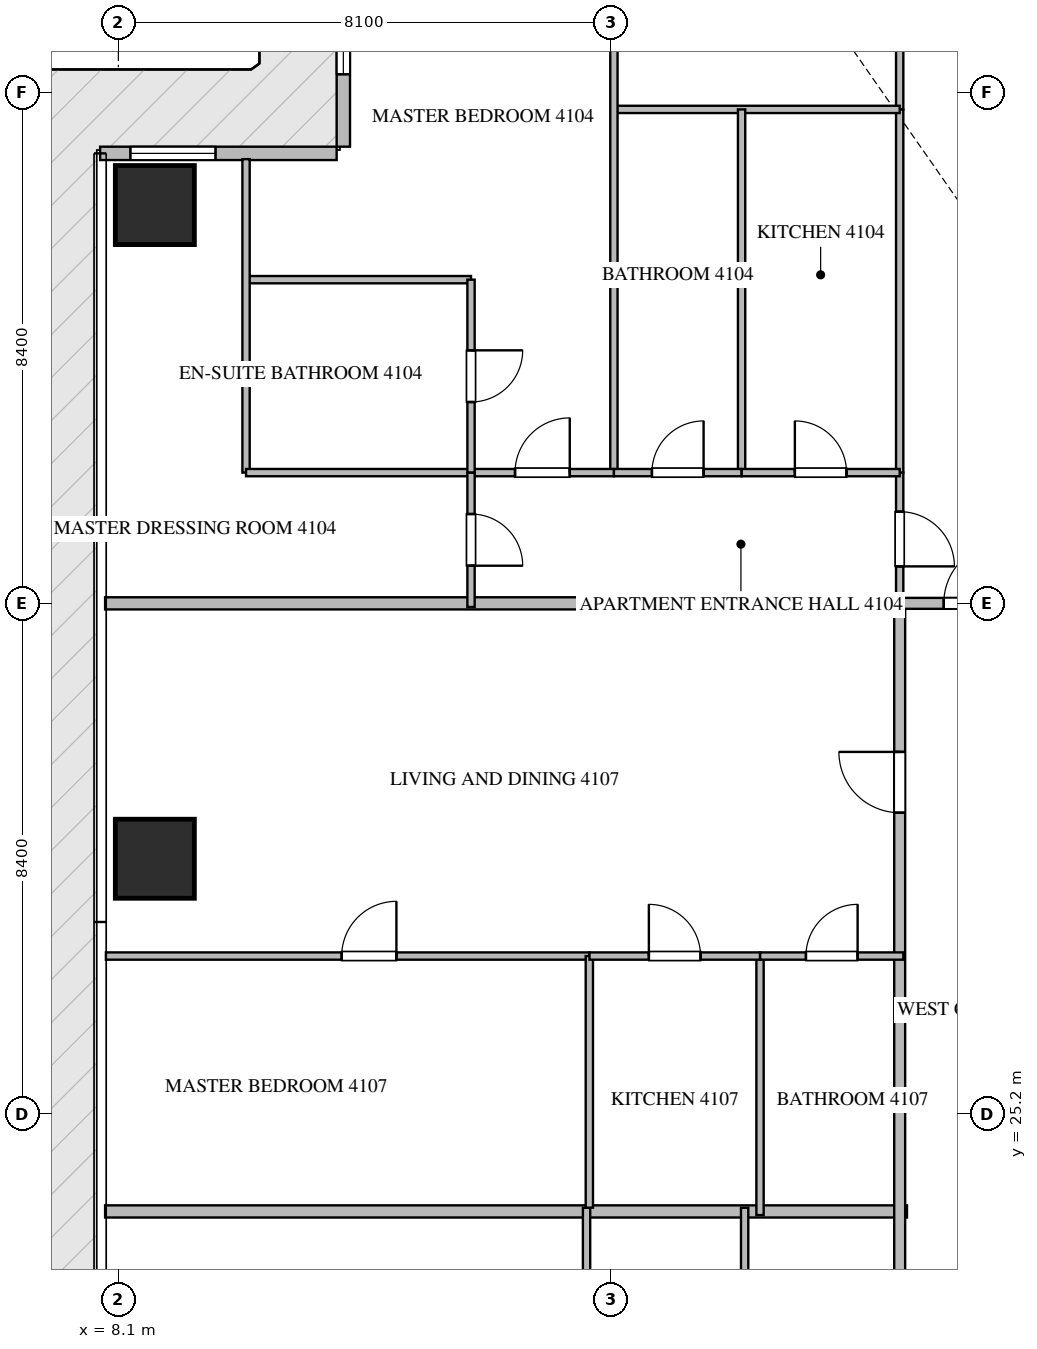
"""IFC4 building model, lengths in metres.
Left out: names, types, materials, properties, quantities, classifications, styles, units other than length and angle.
Written with IfcOpenShell. Run it as: python <this file> out.ifc"""

import sys

from ifc_helpers import new_model, si_unit, direction, frame, frame_2d, origin, origin_2d, place, context, subcontext, project, spatial, rectangle, extrude, source, transform, mapped, element, fill, save


model = new_model("IFC4")
c1 = context("Model", 3, precision=1e-05, world=origin(), true_north=direction((0.0, 1.0)))
c2 = subcontext(c1, "Body", "Model", "MODEL_VIEW")
j1 = project(units=[si_unit("LENGTHUNIT", "METRE"), si_unit("PLANEANGLEUNIT", "RADIAN")], contexts=[c1])
p1 = place(None, origin())
s1 = spatial("IfcSite", under=j1, at=p1, CompositionType="ELEMENT")
p2 = place(p1, origin())
s2 = spatial("IfcBuilding", under=s1, at=p2, CompositionType="ELEMENT")
p3 = place(p2, frame((0.0, 0.0, 165.15)))
s3 = spatial("IfcBuildingStorey", under=s2, at=p3, CompositionType="ELEMENT", Elevation=165.15)
m1 = source(origin(), c2, "Body", "SweptSolid", [
    extrude(rectangle(XDim=1.3, YDim=1.3, at=origin_2d()), origin(), (0.0, 0.0, 1.0), 3.75),
])
for number, where, z_axis, x_axis in (
    (1, (8.7, 29.4, -0.26), (0.0, 0.0, 1.0), (1.0, 0.0, 0.0)),
    (2, (8.7, 40.15, -0.26), (0.0, 0.0, 1.0), (1.0, 0.0, 0.0)),
):
    element("IfcColumn", number, at=place(p3, frame(where, z_axis=z_axis, x_axis=x_axis)), inside=s3, PredefinedType="COLUMN", context=c2, shape_type="MappedRepresentation", body=[
        mapped(m1, transform((0.0, 0.0, 0.0), scale=1.0)),
    ])
p4 = place(p3, frame((11.8, 44.89, 0.0), z_axis=(0.0, 0.0, 1.0), x_axis=(0.0, -1.0, 0.0)))
e3 = element("IfcWall", 3, at=p4, inside=s3, PredefinedType="ELEMENTEDWALL", context=c2, shape_type="SweptSolid", body=[
    extrude(rectangle(XDim=3.78, YDim=0.22, at=frame_2d((1.89, 0.0))), origin(), (0.0, 0.0, 1.0), 3.475),
])
p5 = place(p4, frame((1.19, 0.0, 0.65)))
e4 = element("IfcOpeningElement", 4, at=p5, cuts=e3, PredefinedType="OPENING", context=c2, shape_type="SweptSolid", body=[
    extrude(rectangle(XDim=1.4, YDim=2.05, at=frame_2d((0.7, 1.025))), frame((0.0, 0.12, 0.0), z_axis=(0.0, -1.0, 0.0), x_axis=(1.0, 0.0, 0.0)), (0.0, 0.0, 1.0), 0.24),
])
p6 = place(p3, frame((11.69, 41.0, 0.0), z_axis=(0.0, 0.0, 1.0), x_axis=(-1.0, 0.0, 0.0)))
e5 = element("IfcWall", 5, at=p6, inside=s3, PredefinedType="ELEMENTEDWALL", context=c2, shape_type="SweptSolid", body=[
    extrude(rectangle(XDim=3.89, YDim=0.22, at=frame_2d((1.945, 0.0))), origin(), (0.0, 0.0, 1.0), 3.475),
])
p7 = place(p6, frame((1.992, 0.0, 0.65)))
e6 = element("IfcOpeningElement", 6, at=p7, cuts=e5, PredefinedType="OPENING", context=c2, shape_type="SweptSolid", body=[
    extrude(rectangle(XDim=1.4, YDim=2.05, at=frame_2d((0.7, 1.025))), frame((0.0, 0.12, 0.0), z_axis=(0.0, -1.0, 0.0), x_axis=(1.0, 0.0, 0.0)), (0.0, 0.0, 1.0), 0.24),
])
p8 = place(p3, frame((7.882, 23.6, 0.0), z_axis=(0.0, 0.0, 1.0), x_axis=(1.0, 0.0, 0.0)))
e7 = element("IfcWall", 7, at=p8, inside=s3, PredefinedType="PARTITIONING", context=c2, shape_type="SweptSolid", body=[
    extrude(rectangle(XDim=13.188, YDim=0.2, at=frame_2d((6.594, 0.0))), origin(), (0.0, 0.0, 1.0), 3.49),
])
p9 = place(p3, frame((7.882, 33.6, 0.0), z_axis=(0.0, 0.0, 1.0), x_axis=(1.0, 0.0, 0.0)))
e8 = element("IfcWall", 8, at=p9, inside=s3, PredefinedType="PARTITIONING", context=c2, shape_type="SweptSolid", body=[
    extrude(rectangle(XDim=13.068, YDim=0.2, at=frame_2d((6.534, 0.0))), origin(), (0.0, 0.0, 1.0), 3.49),
])
p10 = place(p3, frame((20.95, 14.9, 0.0), z_axis=(0.0, 0.0, 1.0), x_axis=(0.0, 1.0, 0.0)))
e9 = element("IfcWall", 9, at=p10, inside=s3, PredefinedType="PARTITIONING", context=c2, shape_type="SweptSolid", body=[
    extrude(rectangle(XDim=18.7, YDim=0.18, at=frame_2d((9.35, 0.0))), origin(), (0.0, 0.0, 1.0), 3.49),
])
p11 = place(p10, frame((1.805, 0.0, 0.0)))
e10 = element("IfcOpeningElement", 10, at=p11, cuts=e9, PredefinedType="OPENING", context=c2, shape_type="SweptSolid", body=[
    extrude(rectangle(XDim=1.0, YDim=2.15, at=frame_2d((0.5, 1.075))), frame((0.0, 0.1, 0.0), z_axis=(0.0, -1.0, 0.0), x_axis=(1.0, 0.0, 0.0)), (0.0, 0.0, 1.0), 0.2),
])
p12 = place(p10, frame((15.257, 0.0, 0.0)))
e11 = element("IfcOpeningElement", 11, at=p12, cuts=e9, PredefinedType="OPENING", context=c2, shape_type="SweptSolid", body=[
    extrude(rectangle(XDim=1.0, YDim=2.15, at=frame_2d((0.5, 1.075))), frame((0.0, 0.1, 0.0), z_axis=(0.0, -1.0, 0.0), x_axis=(1.0, 0.0, 0.0)), (0.0, 0.0, 1.0), 0.2),
])
p13 = place(p3, frame((20.952, 33.6, 0.0), z_axis=(0.0, 0.0, 1.0), x_axis=(1.0, 0.0, 0.0)))
e12 = element("IfcWall", 12, at=p13, inside=s3, PredefinedType="PARTITIONING", context=c2, shape_type="SweptSolid", body=[
    extrude(rectangle(XDim=2.446, YDim=0.18, at=frame_2d((1.223, 0.0))), origin(), (0.0, 0.0, 1.0), 3.49),
])
p14 = place(p13, frame((0.723, 0.0, 0.0)))
e13 = element("IfcOpeningElement", 13, at=p14, cuts=e12, PredefinedType="OPENING", context=c2, shape_type="SweptSolid", body=[
    extrude(rectangle(XDim=1.0, YDim=2.15, at=frame_2d((0.5, 1.075))), frame((0.0, 0.1, 0.0), z_axis=(0.0, -1.0, 0.0), x_axis=(1.0, 0.0, 0.0)), (0.0, 0.0, 1.0), 0.2),
])
p15 = place(p3, frame((20.95, 35.75, 0.0), z_axis=(0.0, 0.0, 1.0), x_axis=(0.0, -1.0, 0.0)))
e14 = element("IfcWall", 14, at=p15, inside=s3, PredefinedType="PARTITIONING", context=c2, shape_type="SweptSolid", body=[
    extrude(rectangle(XDim=2.148, YDim=0.12, at=frame_2d((1.074, 0.0))), origin(), (0.0, 0.0, 1.0), 3.49),
])
p16 = place(p15, frame((0.642, 0.0, 0.0)))
e15 = element("IfcOpeningElement", 15, at=p16, cuts=e14, PredefinedType="OPENING", context=c2, shape_type="SweptSolid", body=[
    extrude(rectangle(XDim=0.9, YDim=2.1, at=frame_2d((0.45, 1.05))), frame((0.0, 0.07, 0.0), z_axis=(0.0, -1.0, 0.0), x_axis=(1.0, 0.0, 0.0)), (0.0, 0.0, 1.0), 0.14),
])
p17 = place(p3, frame((20.95, 48.905, 0.0), z_axis=(0.0, 0.0, 1.0), x_axis=(0.0, -1.0, 0.0)))
e16 = element("IfcWall", 16, at=p17, inside=s3, PredefinedType="PARTITIONING", context=c2, shape_type="SweptSolid", body=[
    extrude(rectangle(XDim=7.182, YDim=0.12, at=frame_2d((3.591, 0.0))), origin(), (0.0, 0.0, 1.0), 3.49),
])
p18 = place(p17, frame((3.455, 0.0, 0.0)))
e17 = element("IfcOpeningElement", 17, at=p18, cuts=e16, PredefinedType="OPENING", context=c2, shape_type="SweptSolid", body=[
    extrude(rectangle(XDim=0.9, YDim=2.1, at=frame_2d((0.45, 1.05))), frame((0.0, 0.07, 0.0), z_axis=(0.0, -1.0, 0.0), x_axis=(1.0, 0.0, 0.0)), (0.0, 0.0, 1.0), 0.14),
])
p19 = place(p3, frame((20.95, 41.721, 0.0), z_axis=(0.0, 0.0, 1.0), x_axis=(0.0, -1.0, 0.0)))
e18 = element("IfcWall", 18, at=p19, inside=s3, PredefinedType="PARTITIONING", context=c2, shape_type="SweptSolid", body=[
    extrude(rectangle(XDim=5.969, YDim=0.12, at=frame_2d((2.984, 0.0))), origin(), (0.0, 0.0, 1.0), 3.49),
])
p20 = place(p3, frame((16.25, 41.723, 0.0), z_axis=(0.0, 0.0, 1.0), x_axis=(1.0, 0.0, 0.0)))
e19 = element("IfcWall", 19, at=p20, inside=s3, PredefinedType="PARTITIONING", context=c2, shape_type="SweptSolid", body=[
    extrude(rectangle(XDim=4.7, YDim=0.12, at=frame_2d((2.35, 0.0))), origin(), (0.0, 0.0, 1.0), 3.49),
])
p21 = place(p3, frame((16.25, 48.905, 0.0), z_axis=(0.0, 0.0, 1.0), x_axis=(0.0, -1.0, 0.0)))
e20 = element("IfcWall", 20, at=p21, inside=s3, PredefinedType="PARTITIONING", context=c2, shape_type="SweptSolid", body=[
    extrude(rectangle(XDim=13.155, YDim=0.12, at=frame_2d((6.578, 0.0))), origin(), (0.0, 0.0, 1.0), 3.49),
])
p22 = place(p3, frame((18.35, 41.723, 0.0), z_axis=(0.0, 0.0, 1.0), x_axis=(0.0, -1.0, 0.0)))
e21 = element("IfcWall", 21, at=p22, inside=s3, PredefinedType="PARTITIONING", context=c2, shape_type="SweptSolid", body=[
    extrude(rectangle(XDim=5.973, YDim=0.12, at=frame_2d((2.986, 0.0))), origin(), (0.0, 0.0, 1.0), 3.49),
])
p23 = place(p3, frame((16.25, 35.75, 0.0), z_axis=(0.0, 0.0, 1.0), x_axis=(1.0, 0.0, 0.0)))
e22 = element("IfcWall", 22, at=p23, inside=s3, PredefinedType="PARTITIONING", context=c2, shape_type="SweptSolid", body=[
    extrude(rectangle(XDim=2.1, YDim=0.12, at=frame_2d((1.05, 0.0))), origin(), (0.0, 0.0, 1.0), 3.49),
])
p24 = place(p23, frame((0.625, 0.0, 0.0)))
e23 = element("IfcOpeningElement", 23, at=p24, cuts=e22, PredefinedType="OPENING", context=c2, shape_type="SweptSolid", body=[
    extrude(rectangle(XDim=0.85, YDim=2.1, at=frame_2d((0.425, 1.05))), frame((0.0, 0.07, 0.0), z_axis=(0.0, -1.0, 0.0), x_axis=(1.0, 0.0, 0.0)), (0.0, 0.0, 1.0), 0.14),
])
p25 = place(p3, frame((18.352, 35.75, 0.0), z_axis=(0.0, 0.0, 1.0), x_axis=(1.0, 0.0, 0.0)))
e24 = element("IfcWall", 24, at=p25, inside=s3, PredefinedType="PARTITIONING", context=c2, shape_type="SweptSolid", body=[
    extrude(rectangle(XDim=2.598, YDim=0.12, at=frame_2d((1.299, 0.0))), origin(), (0.0, 0.0, 1.0), 3.49),
])
p26 = place(p25, frame((0.874, 0.0, 0.0)))
e25 = element("IfcOpeningElement", 25, at=p26, cuts=e24, PredefinedType="OPENING", context=c2, shape_type="SweptSolid", body=[
    extrude(rectangle(XDim=0.85, YDim=2.1, at=frame_2d((0.425, 1.05))), frame((0.0, 0.07, 0.0), z_axis=(0.0, -1.0, 0.0), x_axis=(1.0, 0.0, 0.0)), (0.0, 0.0, 1.0), 0.14),
])
p27 = place(p3, frame((13.9, 35.75, 0.0), z_axis=(0.0, 0.0, 1.0), x_axis=(1.0, 0.0, 0.0)))
e26 = element("IfcWall", 26, at=p27, inside=s3, PredefinedType="PARTITIONING", context=c2, shape_type="SweptSolid", body=[
    extrude(rectangle(XDim=2.348, YDim=0.12, at=frame_2d((1.174, 0.0))), origin(), (0.0, 0.0, 1.0), 3.49),
])
p28 = place(p27, frame((0.724, 0.0, 0.0)))
e27 = element("IfcOpeningElement", 27, at=p28, cuts=e26, PredefinedType="OPENING", context=c2, shape_type="SweptSolid", body=[
    extrude(rectangle(XDim=0.9, YDim=2.1, at=frame_2d((0.45, 1.05))), frame((0.0, 0.07, 0.0), z_axis=(0.0, -1.0, 0.0), x_axis=(1.0, 0.0, 0.0)), (0.0, 0.0, 1.0), 0.14),
])
p29 = place(p3, frame((10.2, 38.923, 0.0), z_axis=(0.0, 0.0, 1.0), x_axis=(1.0, 0.0, 0.0)))
e28 = element("IfcWall", 28, at=p29, inside=s3, PredefinedType="PARTITIONING", context=c2, shape_type="SweptSolid", body=[
    extrude(rectangle(XDim=3.7, YDim=0.12, at=frame_2d((1.85, 0.0))), origin(), (0.0, 0.0, 1.0), 3.49),
])
p30 = place(p3, frame((10.2, 40.905, 0.0), z_axis=(0.0, 0.0, 1.0), x_axis=(0.0, -1.0, 0.0)))
e29 = element("IfcWall", 29, at=p30, inside=s3, PredefinedType="PARTITIONING", context=c2, shape_type="SweptSolid", body=[
    extrude(rectangle(XDim=5.155, YDim=0.12, at=frame_2d((2.578, 0.0))), origin(), (0.0, 0.0, 1.0), 3.49),
])
p31 = place(p3, frame((10.2, 35.75, 0.0), z_axis=(0.0, 0.0, 1.0), x_axis=(1.0, 0.0, 0.0)))
e30 = element("IfcWall", 30, at=p31, inside=s3, PredefinedType="PARTITIONING", context=c2, shape_type="SweptSolid", body=[
    extrude(rectangle(XDim=3.698, YDim=0.12, at=frame_2d((1.849, 0.0))), origin(), (0.0, 0.0, 1.0), 3.49),
])
p32 = place(p3, frame((13.9, 38.923, 0.0), z_axis=(0.0, 0.0, 1.0), x_axis=(0.0, -1.0, 0.0)))
e31 = element("IfcWall", 31, at=p32, inside=s3, PredefinedType="PARTITIONING", context=c2, shape_type="SweptSolid", body=[
    extrude(rectangle(XDim=3.173, YDim=0.12, at=frame_2d((1.586, 0.0))), origin(), (0.0, 0.0, 1.0), 3.49),
])
p33 = place(p32, frame((1.162, 0.0, 0.0)))
e32 = element("IfcOpeningElement", 32, at=p33, cuts=e31, PredefinedType="OPENING", context=c2, shape_type="SweptSolid", body=[
    extrude(rectangle(XDim=0.85, YDim=2.1, at=frame_2d((0.425, 1.05))), frame((0.0, 0.07, 0.0), z_axis=(0.0, -1.0, 0.0), x_axis=(1.0, 0.0, 0.0)), (0.0, 0.0, 1.0), 0.14),
])
p34 = place(p3, frame((13.9, 35.748, 0.0), z_axis=(0.0, 0.0, 1.0), x_axis=(0.0, -1.0, 0.0)))
e33 = element("IfcWall", 33, at=p34, inside=s3, PredefinedType="PARTITIONING", context=c2, shape_type="SweptSolid", body=[
    extrude(rectangle(XDim=2.208, YDim=0.12, at=frame_2d((1.104, 0.0))), origin(), (0.0, 0.0, 1.0), 3.49),
])
p35 = place(p34, frame((0.679, 0.0, 0.0)))
e34 = element("IfcOpeningElement", 34, at=p35, cuts=e33, PredefinedType="OPENING", context=c2, shape_type="SweptSolid", body=[
    extrude(rectangle(XDim=0.85, YDim=2.1, at=frame_2d((0.425, 1.05))), frame((0.0, 0.07, 0.0), z_axis=(0.0, -1.0, 0.0), x_axis=(1.0, 0.0, 0.0)), (0.0, 0.0, 1.0), 0.14),
])
for number, where, z_axis, x_axis in (
    (35, (18.4, 19.4, 0.0), (0.0, 0.0, 1.0), (0.0, 1.0, 0.0)),
    (36, (15.8, 19.4, 0.0), (0.0, 0.0, 1.0), (0.0, 1.0, 0.0)),
):
    element("IfcWall", number, at=place(p3, frame(where, z_axis=z_axis, x_axis=x_axis)), inside=s3, PredefinedType="PARTITIONING", context=c2, shape_type="SweptSolid", body=[
        extrude(rectangle(XDim=4.26, YDim=0.12, at=frame_2d((2.13, 0.0))), origin(), (0.0, 0.0, 1.0), 3.49),
    ])
p36 = place(p3, frame((7.895, 27.8, 0.0), z_axis=(0.0, 0.0, 1.0), x_axis=(1.0, 0.0, 0.0)))
e37 = element("IfcWall", 37, at=p36, inside=s3, PredefinedType="PARTITIONING", context=c2, shape_type="SweptSolid", body=[
    extrude(rectangle(XDim=7.951, YDim=0.12, at=frame_2d((3.976, 0.0))), origin(), (0.0, 0.0, 1.0), 3.49),
])
p37 = place(p36, frame((3.878, 0.0, 0.0)))
e38 = element("IfcOpeningElement", 38, at=p37, cuts=e37, PredefinedType="OPENING", context=c2, shape_type="SweptSolid", body=[
    extrude(rectangle(XDim=0.9, YDim=2.1, at=frame_2d((0.45, 1.05))), frame((0.0, 0.07, 0.0), z_axis=(0.0, -1.0, 0.0), x_axis=(1.0, 0.0, 0.0)), (0.0, 0.0, 1.0), 0.14),
])
p38 = place(p3, frame((15.846, 23.662, 0.0), z_axis=(0.0, 0.0, 1.0), x_axis=(0.0, 1.0, 0.0)))
e39 = element("IfcWall", 39, at=p38, inside=s3, PredefinedType="PARTITIONING", context=c2, shape_type="SweptSolid", body=[
    extrude(rectangle(XDim=4.138, YDim=0.12, at=frame_2d((2.069, 0.0))), origin(), (0.0, 0.0, 1.0), 3.49),
])
p39 = place(p3, frame((18.653, 23.54, 0.0), z_axis=(0.0, 0.0, 1.0), x_axis=(0.0, 1.0, 0.0)))
e40 = element("IfcWall", 40, at=p39, inside=s3, PredefinedType="PARTITIONING", context=c2, shape_type="SweptSolid", body=[
    extrude(rectangle(XDim=4.26, YDim=0.12, at=frame_2d((2.13, 0.0))), origin(), (0.0, 0.0, 1.0), 3.49),
])
p40 = place(p3, frame((15.848, 27.8, 0.0), z_axis=(0.0, 0.0, 1.0), x_axis=(1.0, 0.0, 0.0)))
e41 = element("IfcWall", 41, at=p40, inside=s3, PredefinedType="PARTITIONING", context=c2, shape_type="SweptSolid", body=[
    extrude(rectangle(XDim=2.805, YDim=0.12, at=frame_2d((1.403, 0.0))), origin(), (0.0, 0.0, 1.0), 3.49),
])
p41 = place(p40, frame((0.977, 0.0, 0.0)))
e42 = element("IfcOpeningElement", 42, at=p41, cuts=e41, PredefinedType="OPENING", context=c2, shape_type="SweptSolid", body=[
    extrude(rectangle(XDim=0.85, YDim=2.1, at=frame_2d((0.425, 1.05))), frame((0.0, 0.07, 0.0), z_axis=(0.0, -1.0, 0.0), x_axis=(1.0, 0.0, 0.0)), (0.0, 0.0, 1.0), 0.14),
])
p42 = place(p3, frame((18.655, 27.8, 0.0), z_axis=(0.0, 0.0, 1.0), x_axis=(1.0, 0.0, 0.0)))
e43 = element("IfcWall", 43, at=p42, inside=s3, PredefinedType="PARTITIONING", context=c2, shape_type="SweptSolid", body=[
    extrude(rectangle(XDim=2.355, YDim=0.12, at=frame_2d((1.177, 0.0))), origin(), (0.0, 0.0, 1.0), 3.49),
])
p43 = place(p42, frame((0.753, 0.0, 0.0)))
e44 = element("IfcOpeningElement", 44, at=p43, cuts=e43, PredefinedType="OPENING", context=c2, shape_type="SweptSolid", body=[
    extrude(rectangle(XDim=0.85, YDim=2.1, at=frame_2d((0.425, 1.05))), frame((0.0, 0.07, 0.0), z_axis=(0.0, -1.0, 0.0), x_axis=(1.0, 0.0, 0.0)), (0.0, 0.0, 1.0), 0.14),
])
m2 = source(origin(), c2, "Body", "SweptSolid", [
    extrude(rectangle(XDim=1.4, YDim=2.05, at=frame_2d((0.7, 1.025))), frame((0.0, 0.03, 0.0), z_axis=(0.0, -1.0, 0.0), x_axis=(1.0, 0.0, 0.0)), (0.0, 0.0, 1.0), 0.06),
])
p44 = place(p5, origin())
e45 = element("IfcWindow", 45, at=p44, inside=s3, PartitioningType="SINGLE_PANEL", PredefinedType="WINDOW", context=c2, shape_type="MappedRepresentation", body=[
    mapped(m2, transform((0.0, 0.0, 0.0), scale=1.0)),
])
fill(e4, e45)
p45 = place(p7, origin())
e46 = element("IfcWindow", 46, at=p45, inside=s3, PartitioningType="SINGLE_PANEL", PredefinedType="WINDOW", context=c2, shape_type="MappedRepresentation", body=[
    mapped(m2, transform((0.0, 0.0, 0.0), scale=1.0)),
])
fill(e6, e46)
m3 = source(origin(), c2, "Body", "SweptSolid", [
    extrude(rectangle(XDim=1.0, YDim=2.15, at=frame_2d((0.5, 1.075))), frame((0.0, 0.025, 0.0), z_axis=(0.0, -1.0, 0.0), x_axis=(1.0, 0.0, 0.0)), (0.0, 0.0, 1.0), 0.05),
])
p46 = place(p12, origin())
e47 = element("IfcDoor", 47, at=p46, inside=s3, OperationType="SINGLE_SWING_RIGHT", PredefinedType="DOOR", context=c2, shape_type="MappedRepresentation", body=[
    mapped(m3, transform((0.0, 0.0, 0.0), scale=1.0)),
])
fill(e11, e47)
p47 = place(p14, origin())
e48 = element("IfcDoor", 48, at=p47, inside=s3, OperationType="SINGLE_SWING_RIGHT", PredefinedType="DOOR", context=c2, shape_type="MappedRepresentation", body=[
    mapped(m3, transform((0.0, 0.0, 0.0), scale=1.0)),
])
fill(e13, e48)
m4 = source(origin(), c2, "Body", "SweptSolid", [
    extrude(rectangle(XDim=0.9, YDim=2.1, at=frame_2d((0.45, 1.05))), frame((0.0, 0.025, 0.0), z_axis=(0.0, -1.0, 0.0), x_axis=(1.0, 0.0, 0.0)), (0.0, 0.0, 1.0), 0.05),
])
p48 = place(p16, origin())
e49 = element("IfcDoor", 49, at=p48, inside=s3, OperationType="SINGLE_SWING_RIGHT", PredefinedType="DOOR", context=c2, shape_type="MappedRepresentation", body=[
    mapped(m4, transform((0.0, 0.0, 0.0), scale=1.0)),
])
fill(e15, e49)
m5 = source(origin(), c2, "Body", "SweptSolid", [
    extrude(rectangle(XDim=0.85, YDim=2.1, at=frame_2d((0.425, 1.05))), frame((0.0, 0.025, 0.0), z_axis=(0.0, -1.0, 0.0), x_axis=(1.0, 0.0, 0.0)), (0.0, 0.0, 1.0), 0.05),
])
p49 = place(p24, origin())
e50 = element("IfcDoor", 50, at=p49, inside=s3, OperationType="SINGLE_SWING_RIGHT", PredefinedType="DOOR", context=c2, shape_type="MappedRepresentation", body=[
    mapped(m5, transform((0.0, 0.0, 0.0), scale=1.0)),
])
fill(e23, e50)
p50 = place(p26, origin())
e51 = element("IfcDoor", 51, at=p50, inside=s3, OperationType="SINGLE_SWING_LEFT", PredefinedType="DOOR", context=c2, shape_type="MappedRepresentation", body=[
    mapped(m5, transform((0.0, 0.0, 0.0), scale=1.0)),
])
fill(e25, e51)
p51 = place(p28, origin())
e52 = element("IfcDoor", 52, at=p51, inside=s3, OperationType="SINGLE_SWING_RIGHT", PredefinedType="DOOR", context=c2, shape_type="MappedRepresentation", body=[
    mapped(m4, transform((0.0, 0.0, 0.0), scale=1.0)),
])
fill(e27, e52)
p52 = place(p33, origin())
e53 = element("IfcDoor", 53, at=p52, inside=s3, OperationType="SINGLE_SWING_LEFT", PredefinedType="DOOR", context=c2, shape_type="MappedRepresentation", body=[
    mapped(m5, transform((0.0, 0.0, 0.0), scale=1.0)),
])
fill(e32, e53)
p53 = place(p35, origin())
e54 = element("IfcDoor", 54, at=p53, inside=s3, OperationType="SINGLE_SWING_RIGHT", PredefinedType="DOOR", context=c2, shape_type="MappedRepresentation", body=[
    mapped(m5, transform((0.0, 0.0, 0.0), scale=1.0)),
])
fill(e34, e54)
p54 = place(p37, origin())
e55 = element("IfcDoor", 55, at=p54, inside=s3, OperationType="SINGLE_SWING_RIGHT", PredefinedType="DOOR", context=c2, shape_type="MappedRepresentation", body=[
    mapped(m4, transform((0.0, 0.0, 0.0), scale=1.0)),
])
fill(e38, e55)
p55 = place(p41, origin())
e56 = element("IfcDoor", 56, at=p55, inside=s3, OperationType="SINGLE_SWING_LEFT", PredefinedType="DOOR", context=c2, shape_type="MappedRepresentation", body=[
    mapped(m5, transform((0.0, 0.0, 0.0), scale=1.0)),
])
fill(e42, e56)
p56 = place(p43, origin())
e57 = element("IfcDoor", 57, at=p56, inside=s3, OperationType="SINGLE_SWING_RIGHT", PredefinedType="DOOR", context=c2, shape_type="MappedRepresentation", body=[
    mapped(m5, transform((0.0, 0.0, 0.0), scale=1.0)),
])
fill(e44, e57)
save(model, sys.argv[1])
